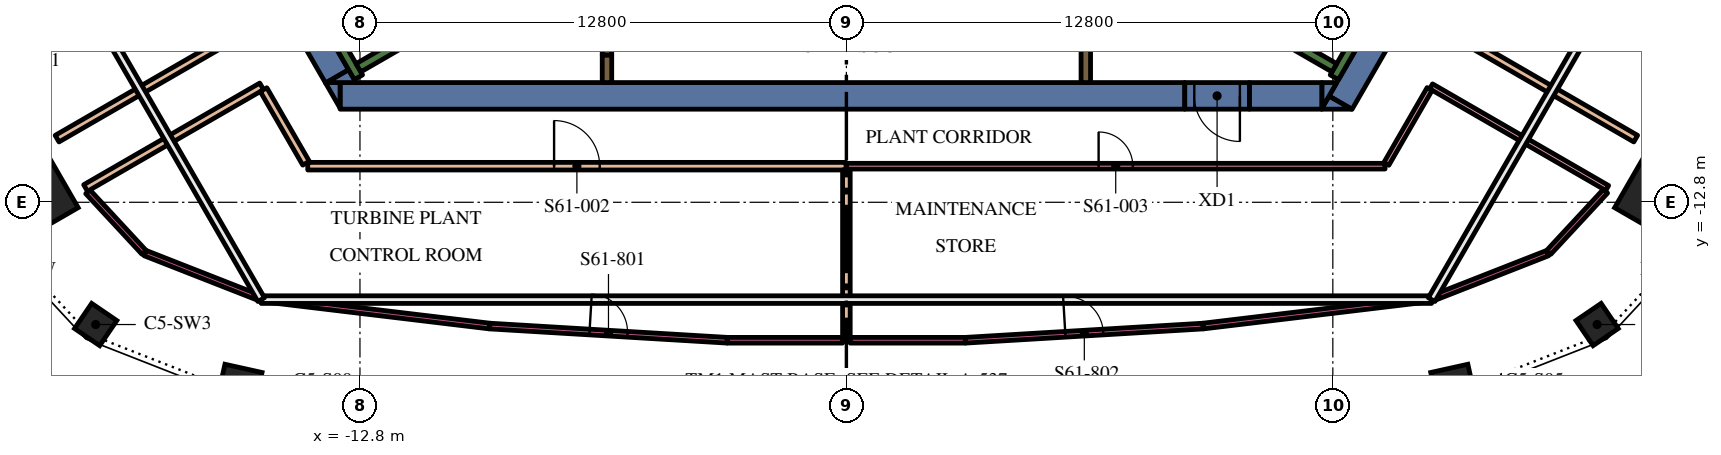
"""IFC4 building model, lengths in metres.
Left out: names, types, materials, properties, quantities, classifications, styles, units other than length and angle.
Written with IfcOpenShell. Run it as: python <this file> out.ifc"""

import sys

from ifc_helpers import new_model, si_unit, direction, frame, frame_2d, origin, origin_2d, place, context, subcontext, project, spatial, polyline, rectangle, outline, extrude, element, fill, save


model = new_model("IFC4")
c1 = context("Model", 3, precision=1e-05, world=origin(), true_north=direction((0.0, 1.0)))
c2 = subcontext(c1, "Body", "Model", "MODEL_VIEW")
j1 = project(units=[si_unit("LENGTHUNIT", "METRE"), si_unit("PLANEANGLEUNIT", "RADIAN")], contexts=[c1])
p1 = place(None, origin())
s1 = spatial("IfcSite", under=j1, at=p1, CompositionType="ELEMENT")
p2 = place(p1, origin())
s2 = spatial("IfcBuilding", under=s1, at=p2, CompositionType="ELEMENT")
p3 = place(p2, frame((0.0, 0.0, 261.6)))
s3 = spatial("IfcBuildingStorey", under=s2, at=p3, CompositionType="ELEMENT", Elevation=261.6)
for number, where, z_axis, x_axis in (
    (1, (21.718, -12.539, 0.0), (0.0, 0.0, 1.0), (0.866, -0.5, 0.0)),
    (2, (-21.718, -12.539, 0.0), (0.0, 0.0, 1.0), (-0.866, -0.5, 0.0)),
):
    element("IfcColumn", number, at=place(p3, frame(where, z_axis=z_axis, x_axis=x_axis)), inside=s3, PredefinedType="COLUMN", context=c2, shape_type="SweptSolid", body=[
        extrude(rectangle(XDim=2.2, YDim=2.2, at=origin_2d()), origin(), (0.0, 0.0, 1.0), 5.4),
    ])
for number, where, z_axis, x_axis in (
    (3, (-15.941, -17.512, 0.0), (0.0, 0.0, 1.0), (0.976, -0.217, 0.0)),
    (4, (15.941, -17.512, 0.0), (0.0, 0.0, 1.0), (0.976, 0.217, 0.0)),
):
    element("IfcColumn", number, at=place(p3, frame(where, z_axis=z_axis, x_axis=x_axis)), inside=s3, PredefinedType="COLUMN", context=c2, shape_type="SweptSolid", body=[
        extrude(rectangle(XDim=1.0, YDim=0.7, at=origin_2d()), origin(), (0.0, 0.0, 1.0), 5.4),
    ])
for number, where, z_axis, x_axis in (
    (5, (19.754, -16.017, 0.0), (0.0, 0.0, 1.0), (0.826, 0.563, 0.0)),
    (6, (-19.754, -16.017, 0.0), (0.0, 0.0, 1.0), (0.826, -0.563, 0.0)),
):
    element("IfcColumn", number, at=place(p3, frame(where, z_axis=z_axis, x_axis=x_axis)), inside=s3, PredefinedType="COLUMN", context=c2, shape_type="SweptSolid", body=[
        extrude(rectangle(XDim=0.8, YDim=0.8, at=origin_2d()), origin(), (0.0, 0.0, 1.0), 5.4),
    ])
p4 = place(p3, frame((13.003, -10.179, 0.0), z_axis=(0.0, 0.0, 1.0), x_axis=(0.499972675833, 0.866041178825, 0.0)))
e7 = element("IfcWall", 7, at=p4, inside=s3, PredefinedType="SOLIDWALL", context=c2, shape_type="SweptSolid", body=[
    extrude(rectangle(XDim=3.829, YDim=0.7, at=frame_2d((1.915, 0.0))), origin(), (0.0, 0.0, 1.0), 5.4),
])
p5 = place(p3, origin())
e8 = element("IfcWall", 8, at=p5, inside=s3, PredefinedType="SOLIDWALL", context=c2, shape_type="SweptSolid", body=[
    extrude(outline(polyline([(12.698, -10.005), (13.296, -10.35), (12.5, -10.35), (12.698, -10.005)])), origin(), (0.0, 0.0, 1.0), 5.4),
])
p6 = place(p3, frame((10.604, -10.0, 0.0), z_axis=(0.0, 0.0, 1.0), x_axis=(1.0, 0.0, 0.0)))
e9 = element("IfcWall", 9, at=p6, inside=s3, PredefinedType="SOLIDWALL", context=c2, shape_type="SweptSolid", body=[
    extrude(rectangle(XDim=1.909, YDim=0.7, at=frame_2d((0.955, 0.0))), origin(), (0.0, 0.0, 1.0), 5.4),
])
e10 = element("IfcWall", 10, at=p5, inside=s3, PredefinedType="SOLIDWALL", context=c2, shape_type="SweptSolid", body=[
    extrude(outline(polyline([(12.904, -9.65), (12.516, -10.322), (12.516, -9.65), (12.904, -9.65)])), origin(), (0.0, 0.0, 1.0), 5.4),
])
p7 = place(p3, frame((8.904, -10.0, 0.0), z_axis=(0.0, 0.0, 1.0), x_axis=(-1.0, 0.0, 0.0)))
e11 = element("IfcWall", 11, at=p7, inside=s3, PredefinedType="SOLIDWALL", context=c2, shape_type="SweptSolid", body=[
    extrude(rectangle(XDim=22.226, YDim=0.7, at=frame_2d((11.113, 0.0))), origin(), (0.0, 0.0, 1.0), 5.4),
])
e12 = element("IfcWall", 12, at=p5, inside=s3, PredefinedType="SOLIDWALL", context=c2, shape_type="SweptSolid", body=[
    extrude(outline(polyline([(-13.712, -9.65), (-13.324, -9.65), (-13.324, -10.322), (-13.712, -9.65)])), origin(), (0.0, 0.0, 1.0), 5.4),
])
p8 = place(p3, frame((-13.402, -9.487, 0.0), z_axis=(0.0, 0.0, 1.0), x_axis=(-0.500020498207, 0.866013568815, 0.0)))
e13 = element("IfcWall", 13, at=p8, inside=s3, PredefinedType="SOLIDWALL", context=c2, shape_type="SweptSolid", body=[
    extrude(rectangle(XDim=3.829, YDim=0.7, at=frame_2d((1.915, 0.0))), origin(), (0.0, 0.0, 1.0), 5.4),
])
e14 = element("IfcWall", 14, at=p5, inside=s3, PredefinedType="SOLIDWALL", context=c2, shape_type="SweptSolid", body=[
    extrude(outline(polyline([(-12.904, -9.65), (-13.68, -9.65), (-13.098, -9.314), (-12.904, -9.65)])), origin(), (0.0, 0.0, 1.0), 5.4),
])
p9 = place(p3, frame((12.84, -9.511, 0.0), z_axis=(0.0, 0.0, 1.0), x_axis=(0.500048121057, 0.865997619297, 0.0)))
e15 = element("IfcWall", 15, at=p9, inside=s3, PredefinedType="SOLIDWALL", context=c2, shape_type="SweptSolid", body=[
    extrude(rectangle(XDim=3.634, YDim=0.25, at=frame_2d((1.817, 0.0))), origin(), (0.0, 0.0, 1.0), 5.4),
])
p10 = place(p3, frame((12.84, -9.261, 0.0), z_axis=(0.0, 0.0, 1.0), x_axis=(-0.866013990052, 0.500019768644, 0.0)))
e16 = element("IfcWall", 16, at=p10, inside=s3, PredefinedType="SOLIDWALL", context=c2, shape_type="SweptSolid", body=[
    extrude(rectangle(XDim=6.8, YDim=0.25, at=frame_2d((3.4, 0.0))), origin(), (0.0, 0.0, 1.0), 5.4),
])
p11 = place(p3, frame((-12.84, -9.511, 0.0), z_axis=(0.0, 0.0, 1.0), x_axis=(-0.499997733992, 0.866026712061, 0.0)))
e17 = element("IfcWall", 17, at=p11, inside=s3, PredefinedType="SOLIDWALL", context=c2, shape_type="SweptSolid", body=[
    extrude(rectangle(XDim=3.634, YDim=0.25, at=frame_2d((1.817, 0.0))), origin(), (0.0, 0.0, 1.0), 5.4),
])
p12 = place(p3, frame((-12.84, -9.261, 0.0), z_axis=(0.0, 0.0, 1.0), x_axis=(0.866016039709, 0.500016218704, 0.0)))
e18 = element("IfcWall", 18, at=p12, inside=s3, PredefinedType="SOLIDWALL", context=c2, shape_type="SweptSolid", body=[
    extrude(rectangle(XDim=7.05, YDim=0.25, at=frame_2d((3.525, 0.0))), origin(), (0.0, 0.0, 1.0), 5.4),
])
p13 = place(p3, frame((6.3, -9.65, 0.0), z_axis=(0.0, 0.0, 1.0), x_axis=(0.0, 1.0, 0.0)))
e19 = element("IfcWall", 19, at=p13, inside=s3, PredefinedType="SOLIDWALL", context=c2, shape_type="SweptSolid", body=[
    extrude(rectangle(XDim=1.008, YDim=0.25, at=frame_2d((0.504, 0.0))), origin(), (0.0, 0.0, 1.0), 5.4),
])
p14 = place(p3, frame((-6.3, -8.925, 0.0), z_axis=(0.0, 0.0, 1.0), x_axis=(0.0, -1.0, 0.0)))
e20 = element("IfcWall", 20, at=p14, inside=s3, PredefinedType="SOLIDWALL", context=c2, shape_type="SweptSolid", body=[
    extrude(rectangle(XDim=0.725, YDim=0.25, at=frame_2d((0.363, 0.0))), origin(), (0.0, 0.0, 1.0), 5.4),
])
p15 = place(p3, frame((-6.3, -7.125, 0.0), z_axis=(0.0, 0.0, 1.0), x_axis=(0.0, -1.0, 0.0)))
e21 = element("IfcWall", 21, at=p15, inside=s3, PredefinedType="SOLIDWALL", context=c2, shape_type="SweptSolid", body=[
    extrude(rectangle(XDim=1.8, YDim=0.25, at=frame_2d((0.9, 0.0))), origin(), (0.0, 0.0, 1.0), 5.4),
])
p16 = place(p15, frame((0.45, 0.0, 0.0)))
e22 = element("IfcOpeningElement", 22, at=p16, cuts=e21, PredefinedType="OPENING", context=c2, shape_type="SweptSolid", body=[
    extrude(rectangle(XDim=0.9, YDim=2.1, at=frame_2d((0.45, 1.05))), frame((0.0, 0.135, 0.0), z_axis=(0.0, -1.0, 0.0), x_axis=(1.0, 0.0, 0.0)), (0.0, 0.0, 1.0), 0.27),
])
p17 = place(p3, frame((10.604, -10.0, 0.0), z_axis=(0.0, 0.0, 1.0), x_axis=(-1.0, 0.0, 0.0)))
e23 = element("IfcWall", 23, at=p17, inside=s3, PredefinedType="SOLIDWALL", context=c2, shape_type="SweptSolid", body=[
    extrude(rectangle(XDim=1.7, YDim=0.7, at=frame_2d((0.85, 0.0))), origin(), (0.0, 0.0, 1.0), 5.4),
])
p18 = place(p17, frame((0.25, 0.0, 0.0)))
e24 = element("IfcOpeningElement", 24, at=p18, cuts=e23, PredefinedType="OPENING", context=c2, shape_type="SweptSolid", body=[
    extrude(rectangle(XDim=1.2, YDim=2.1, at=frame_2d((0.6, 1.05))), frame((0.0, 0.36, 0.0), z_axis=(0.0, -1.0, 0.0), x_axis=(1.0, 0.0, 0.0)), (0.0, 0.0, 1.0), 0.72),
])
p19 = place(p3, frame((-0.0, -11.85, 0.0), z_axis=(0.0, 0.0, 1.0), x_axis=(1.0, 0.0, 0.0)))
e25 = element("IfcWall", 25, at=p19, inside=s3, PredefinedType="PARTITIONING", context=c2, shape_type="SweptSolid", body=[
    extrude(rectangle(XDim=14.174, YDim=0.15, at=frame_2d((7.087, 0.0))), origin(), (0.0, 0.0, 1.0), 4.75),
])
p20 = place(p19, frame((6.637, 0.0, 0.0)))
e26 = element("IfcOpeningElement", 26, at=p20, cuts=e25, PredefinedType="OPENING", context=c2, shape_type="SweptSolid", body=[
    extrude(rectangle(XDim=0.9, YDim=2.1, at=frame_2d((0.45, 1.05))), frame((0.0, 0.085, 0.0), z_axis=(0.0, -1.0, 0.0), x_axis=(1.0, 0.0, 0.0)), (0.0, 0.0, 1.0), 0.17),
])
p21 = place(p3, frame((-14.174, -11.85, 0.0), z_axis=(0.0, 0.0, 1.0), x_axis=(1.0, 0.0, 0.0)))
e27 = element("IfcWall", 27, at=p21, inside=s3, PredefinedType="PARTITIONING", context=c2, shape_type="SweptSolid", body=[
    extrude(rectangle(XDim=14.164, YDim=0.2, at=frame_2d((7.082, 0.0))), origin(), (0.0, 0.0, 1.0), 4.75),
])
p22 = place(p21, frame((6.482, 0.0, 0.0)))
e28 = element("IfcOpeningElement", 28, at=p22, cuts=e27, PredefinedType="OPENING", context=c2, shape_type="SweptSolid", body=[
    extrude(rectangle(XDim=1.2, YDim=2.1, at=frame_2d((0.6, 1.05))), frame((0.0, 0.11, 0.0), z_axis=(0.0, -1.0, 0.0), x_axis=(1.0, 0.0, 0.0)), (0.0, 0.0, 1.0), 0.22),
])
p23 = place(p3, frame((-15.387, -9.75, 0.0), z_axis=(0.0, 0.0, 1.0), x_axis=(-0.866024483152, -0.500001594578, 0.0)))
e29 = element("IfcWall", 29, at=p23, inside=s3, PredefinedType="PARTITIONING", context=c2, shape_type="SweptSolid", body=[
    extrude(rectangle(XDim=5.35, YDim=0.2, at=frame_2d((2.675, 0.0))), origin(), (0.0, 0.0, 1.0), 4.75),
])
p24 = place(p3, frame((20.02, -12.425, 0.0), z_axis=(0.0, 0.0, 1.0), x_axis=(-0.866024483152, 0.500001594578, 0.0)))
e30 = element("IfcWall", 30, at=p24, inside=s3, PredefinedType="PARTITIONING", context=c2, shape_type="SweptSolid", body=[
    extrude(rectangle(XDim=5.35, YDim=0.15, at=frame_2d((2.675, 0.0))), origin(), (0.0, 0.0, 1.0), 4.75),
])
for number, where, z_axis, x_axis in (
    (31, (-20.77, -11.125, 0.0), (0.0, 0.0, 1.0), (0.866, 0.5, 0.0)),
    (32, (16.137, -8.45, 0.0), (0.0, 0.0, 1.0), (0.866, -0.5, 0.0)),
):
    element("IfcWall", number, at=place(p3, frame(where, z_axis=z_axis, x_axis=x_axis)), inside=s3, PredefinedType="PARTITIONING", context=c2, shape_type="SweptSolid", body=[
        extrude(rectangle(XDim=5.35, YDim=0.2, at=frame_2d((2.675, 0.0))), origin(), (0.0, 0.0, 1.0), 4.75),
    ])
p25 = place(p3, frame((0.0, -11.95, 0.0), z_axis=(0.0, 0.0, 1.0), x_axis=(0.0, -1.0, 0.0)))
e33 = element("IfcWall", 33, at=p25, inside=s3, PredefinedType="PARTITIONING", context=c2, shape_type="SweptSolid", body=[
    extrude(rectangle(XDim=4.455, YDim=0.2, at=frame_2d((2.228, 0.0))), origin(), (0.0, 0.0, 1.0), 4.75),
])
p26 = place(p3, frame((-14.219, -11.772, 0.0), z_axis=(0.0, 0.0, 1.0), x_axis=(-0.499968249168, 0.86604373436, 0.0)))
e34 = element("IfcWall", 34, at=p26, inside=s3, PredefinedType="PARTITIONING", context=c2, shape_type="SweptSolid", body=[
    extrude(rectangle(XDim=2.236, YDim=0.2, at=frame_2d((1.118, 0.0))), origin(), (0.0, 0.0, 1.0), 4.75),
])
p27 = place(p3, frame((15.347, -9.819, 0.0), z_axis=(0.0, 0.0, 1.0), x_axis=(-0.50001657589, -0.866015833478, 0.0)))
e35 = element("IfcWall", 35, at=p27, inside=s3, PredefinedType="PARTITIONING", context=c2, shape_type="SweptSolid", body=[
    extrude(rectangle(XDim=2.275, YDim=0.15, at=frame_2d((1.138, 0.0))), origin(), (0.0, 0.0, 1.0), 4.75),
])
p28 = place(p3, frame((-9.386, -16.057, 0.0), z_axis=(0.0, 0.0, 1.0), x_axis=(0.998219082879, -0.059654526865, 0.0)))
e36 = element("IfcWall", 36, at=p28, inside=s3, PredefinedType="PARTITIONING", context=c2, shape_type="SweptSolid", body=[
    extrude(rectangle(XDim=6.262, YDim=0.15, at=frame_2d((3.131, 0.0))), origin(), (0.0, 0.0, 1.0), 5.15),
])
p29 = place(p28, frame((2.631, 0.0, 0.0)))
e37 = element("IfcOpeningElement", 37, at=p29, cuts=e36, PredefinedType="OPENING", context=c2, shape_type="SweptSolid", body=[
    extrude(rectangle(XDim=1.0, YDim=2.1, at=frame_2d((0.5, 1.05))), frame((0.0, 0.085, 0.0), z_axis=(0.0, -1.0, 0.0), x_axis=(1.0, 0.0, 0.0)), (0.0, 0.0, 1.0), 0.17),
])
p30 = place(p3, frame((-15.384, -15.338, 0.0), z_axis=(0.0, 0.0, 1.0), x_axis=(0.992885830537, -0.119070262948, 0.0)))
e38 = element("IfcWall", 38, at=p30, inside=s3, PredefinedType="PARTITIONING", context=c2, shape_type="SweptSolid", body=[
    extrude(rectangle(XDim=6.036, YDim=0.15, at=frame_2d((3.018, 0.0))), origin(), (0.0, 0.0, 1.0), 5.15),
])
p31 = place(p3, frame((-18.453, -14.137, 0.0), z_axis=(0.0, 0.0, 1.0), x_axis=(0.930983128498, -0.365062206277, 0.0)))
e39 = element("IfcWall", 39, at=p31, inside=s3, PredefinedType="PARTITIONING", context=c2, shape_type="SweptSolid", body=[
    extrude(rectangle(XDim=3.277, YDim=0.15, at=frame_2d((1.638, 0.0))), origin(), (0.0, 0.0, 1.0), 5.15),
])
p32 = place(p3, frame((-3.131, -16.43, 0.0), z_axis=(0.0, 0.0, 1.0), x_axis=(1.0, 0.0, 0.0)))
e40 = element("IfcWall", 40, at=p32, inside=s3, PredefinedType="PARTITIONING", context=c2, shape_type="SweptSolid", body=[
    extrude(rectangle(XDim=3.031, YDim=0.15, at=frame_2d((1.515, 0.0))), origin(), (0.0, 0.0, 1.0), 5.15),
])
p33 = place(p3, frame((-19.961, -12.523, 0.0), z_axis=(0.0, 0.0, 1.0), x_axis=(0.680313409729, -0.732921322205, 0.0)))
e41 = element("IfcWall", 41, at=p33, inside=s3, PredefinedType="PARTITIONING", context=c2, shape_type="SweptSolid", body=[
    extrude(rectangle(XDim=2.177, YDim=0.15, at=frame_2d((1.088, 0.0))), origin(), (0.0, 0.0, 1.0), 5.15),
])
p34 = place(p3, frame((3.135, -16.43, 0.0), z_axis=(0.0, 0.0, 1.0), x_axis=(0.998219082879, 0.059654526865, 0.0)))
e42 = element("IfcWall", 42, at=p34, inside=s3, PredefinedType="PARTITIONING", context=c2, shape_type="SweptSolid", body=[
    extrude(rectangle(XDim=6.262, YDim=0.15, at=frame_2d((3.131, 0.0))), origin(), (0.0, 0.0, 1.0), 5.15),
])
p35 = place(p34, frame((2.631, 0.0, 0.0)))
e43 = element("IfcOpeningElement", 43, at=p35, cuts=e42, PredefinedType="OPENING", context=c2, shape_type="SweptSolid", body=[
    extrude(rectangle(XDim=1.0, YDim=2.1, at=frame_2d((0.5, 1.05))), frame((0.0, 0.085, 0.0), z_axis=(0.0, -1.0, 0.0), x_axis=(1.0, 0.0, 0.0)), (0.0, 0.0, 1.0), 0.17),
])
p36 = place(p3, frame((9.39, -16.056, 0.0), z_axis=(0.0, 0.0, 1.0), x_axis=(0.992885830537, 0.119070262948, 0.0)))
e44 = element("IfcWall", 44, at=p36, inside=s3, PredefinedType="PARTITIONING", context=c2, shape_type="SweptSolid", body=[
    extrude(rectangle(XDim=6.036, YDim=0.15, at=frame_2d((3.018, 0.0))), origin(), (0.0, 0.0, 1.0), 5.15),
])
p37 = place(p3, frame((15.402, -15.333, 0.0), z_axis=(0.0, 0.0, 1.0), x_axis=(0.930983128498, 0.365062206277, 0.0)))
e45 = element("IfcWall", 45, at=p37, inside=s3, PredefinedType="PARTITIONING", context=c2, shape_type="SweptSolid", body=[
    extrude(rectangle(XDim=3.277, YDim=0.15, at=frame_2d((1.638, 0.0))), origin(), (0.0, 0.0, 1.0), 5.15),
])
p38 = place(p3, frame((0.1, -16.43, 0.0), z_axis=(0.0, 0.0, 1.0), x_axis=(1.0, 0.0, 0.0)))
e46 = element("IfcWall", 46, at=p38, inside=s3, PredefinedType="PARTITIONING", context=c2, shape_type="SweptSolid", body=[
    extrude(rectangle(XDim=3.031, YDim=0.15, at=frame_2d((1.515, 0.0))), origin(), (0.0, 0.0, 1.0), 5.15),
])
p39 = place(p3, frame((18.481, -14.118, 0.0), z_axis=(0.0, 0.0, 1.0), x_axis=(0.680331721343, 0.732904324544, 0.0)))
e47 = element("IfcWall", 47, at=p39, inside=s3, PredefinedType="PARTITIONING", context=c2, shape_type="SweptSolid", body=[
    extrude(rectangle(XDim=2.197, YDim=0.15, at=frame_2d((1.098, 0.0))), origin(), (0.0, 0.0, 1.0), 5.15),
])
p40 = place(p3, frame((0.0, -17.503, 0.0), z_axis=(0.0, 0.0, 1.0), x_axis=(1.0, 0.0, 0.0)))
e48 = element("IfcColumn", 48, at=p40, inside=s3, PredefinedType="USERDEFINED", context=c2, shape_type="SweptSolid", body=[
    extrude(rectangle(XDim=0.55, YDim=0.55, at=origin_2d()), origin(), (0.0, 0.0, 1.0), 0.7),
])
p41 = place(p18, origin())
e49 = element("IfcDoor", 49, at=p41, inside=s3, OperationType="SINGLE_SWING_LEFT", PredefinedType="DOOR", context=c2, shape_type="SweptSolid", body=[
    extrude(rectangle(XDim=1.2, YDim=2.1, at=frame_2d((0.6, 1.05))), frame((0.0, 0.025, 0.0), z_axis=(0.0, -1.0, 0.0), x_axis=(1.0, 0.0, 0.0)), (0.0, 0.0, 1.0), 0.05),
])
fill(e24, e49)
p42 = place(p22, origin())
e50 = element("IfcDoor", 50, at=p42, inside=s3, OperationType="SINGLE_SWING_RIGHT", PredefinedType="DOOR", context=c2, shape_type="SweptSolid", body=[
    extrude(rectangle(XDim=1.2, YDim=2.1, at=frame_2d((0.6, 1.05))), frame((0.0, 0.025, 0.0), z_axis=(0.0, -1.0, 0.0), x_axis=(1.0, 0.0, 0.0)), (0.0, 0.0, 1.0), 0.05),
])
fill(e28, e50)
p43 = place(p20, origin())
e51 = element("IfcDoor", 51, at=p43, inside=s3, OperationType="SINGLE_SWING_RIGHT", PredefinedType="DOOR", context=c2, shape_type="SweptSolid", body=[
    extrude(rectangle(XDim=0.9, YDim=2.1, at=frame_2d((0.45, 1.05))), frame((0.0, 0.025, 0.0), z_axis=(0.0, -1.0, 0.0), x_axis=(1.0, 0.0, 0.0)), (0.0, 0.0, 1.0), 0.05),
])
fill(e26, e51)
p44 = place(p29, origin())
e52 = element("IfcDoor", 52, at=p44, inside=s3, OperationType="SINGLE_SWING_LEFT", PredefinedType="DOOR", context=c2, shape_type="SweptSolid", body=[
    extrude(rectangle(XDim=1.0, YDim=2.1, at=frame_2d((0.5, 1.05))), frame((0.0, 0.025, 0.0), z_axis=(0.0, -1.0, 0.0), x_axis=(1.0, 0.0, 0.0)), (0.0, 0.0, 1.0), 0.05),
])
fill(e37, e52)
p45 = place(p35, origin())
e53 = element("IfcDoor", 53, at=p45, inside=s3, OperationType="SINGLE_SWING_LEFT", PredefinedType="DOOR", context=c2, shape_type="SweptSolid", body=[
    extrude(rectangle(XDim=1.0, YDim=2.1, at=frame_2d((0.5, 1.05))), frame((0.0, 0.025, 0.0), z_axis=(0.0, -1.0, 0.0), x_axis=(1.0, 0.0, 0.0)), (0.0, 0.0, 1.0), 0.05),
])
fill(e43, e53)
save(model, sys.argv[1])
